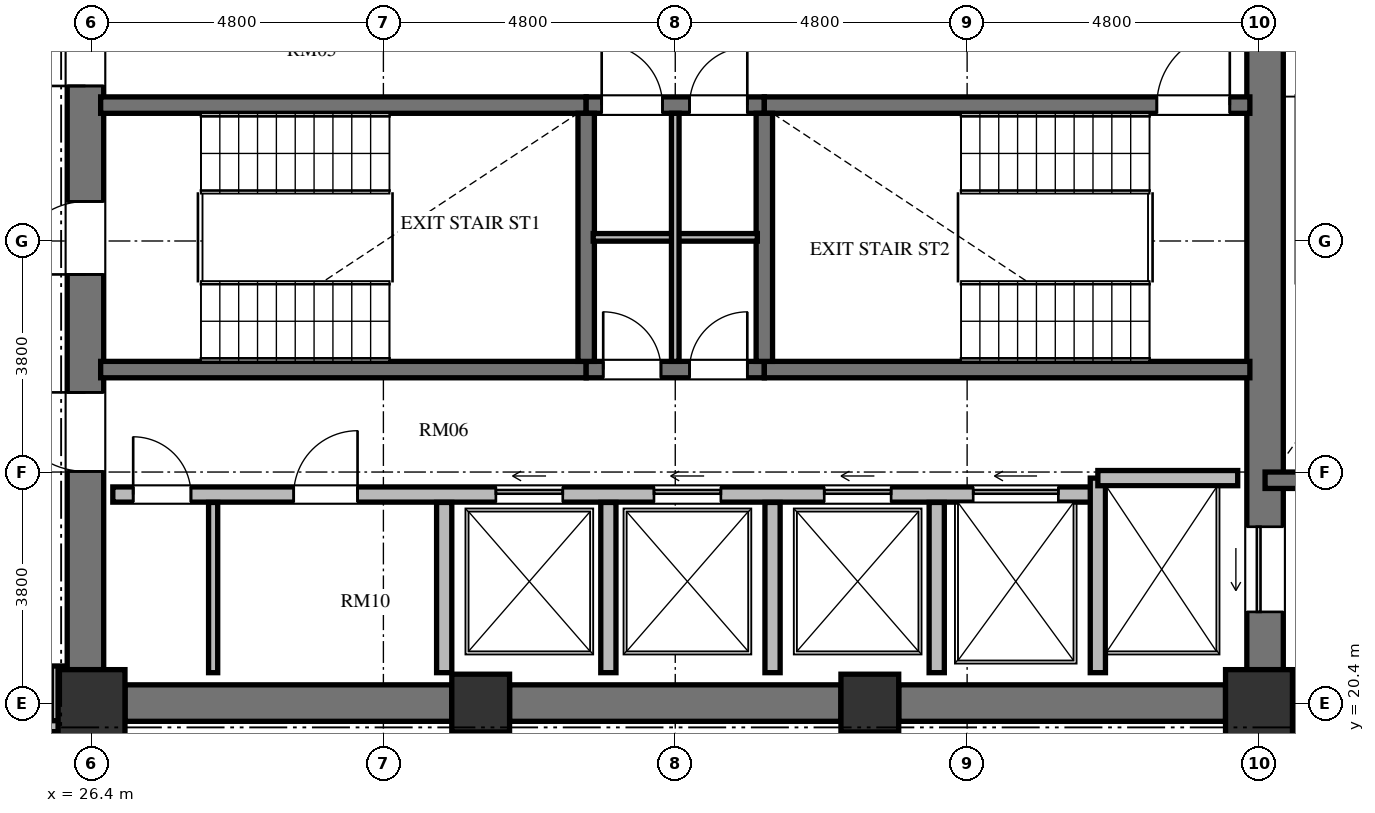
"""IFC4 building model, lengths in metres.
Left out: names, types, materials, properties, quantities, classifications, styles, units other than length and angle.
Written with IfcOpenShell. Run it as: python <this file> out.ifc"""

import sys

from ifc_helpers import new_model, si_unit, direction, frame, frame_2d, origin, origin_2d, place, context, subcontext, project, spatial, rectangle, extrude, element, fill, save


model = new_model("IFC4")
c1 = context("Model", 3, precision=1e-05, world=origin(), true_north=direction((0.0, 1.0)))
c2 = subcontext(c1, "Body", "Model", "MODEL_VIEW")
j1 = project(units=[si_unit("LENGTHUNIT", "METRE"), si_unit("PLANEANGLEUNIT", "RADIAN")], contexts=[c1])
p1 = place(None, origin())
s1 = spatial("IfcSite", under=j1, at=p1, CompositionType="ELEMENT")
p2 = place(p1, origin())
s2 = spatial("IfcBuilding", under=s1, at=p2, CompositionType="ELEMENT")
p3 = place(p2, frame((0.0, 0.0, 182.064)))
s3 = spatial("IfcBuildingStorey", under=s2, at=p3, CompositionType="ELEMENT", Elevation=182.064)
p4 = place(p3, frame((26.4, 20.4, 0.0), z_axis=(0.0, 0.0, 1.0), x_axis=(1.0, 0.0, 0.0)))
e1 = element("IfcColumn", 1, at=p4, inside=s3, PredefinedType="COLUMN", context=c2, shape_type="SweptSolid", body=[
    extrude(rectangle(XDim=1.1, YDim=1.1, at=origin_2d()), origin(), (0.0, 0.0, 1.0), 3.648),
])
for number, where, z_axis, x_axis in (
    (2, (32.8, 20.4, 0.0), (0.0, 0.0, 1.0), (1.0, 0.0, 0.0)),
    (3, (39.2, 20.4, 0.0), (0.0, 0.0, 1.0), (1.0, 0.0, 0.0)),
):
    element("IfcColumn", number, at=place(p3, frame(where, z_axis=z_axis, x_axis=x_axis)), inside=s3, PredefinedType="COLUMN", context=c2, shape_type="SweptSolid", body=[
        extrude(rectangle(XDim=0.95, YDim=0.95, at=origin_2d()), origin(), (0.0, 0.0, 1.0), 3.648),
    ])
p5 = place(p3, frame((45.6, 20.4, 0.0), z_axis=(0.0, 0.0, 1.0), x_axis=(1.0, 0.0, 0.0)))
e4 = element("IfcColumn", 4, at=p5, inside=s3, PredefinedType="COLUMN", context=c2, shape_type="SweptSolid", body=[
    extrude(rectangle(XDim=1.1, YDim=1.1, at=origin_2d()), origin(), (0.0, 0.0, 1.0), 3.648),
])
p6 = place(p3, frame((26.3, 20.95, 0.0), z_axis=(0.0, 0.0, 1.0), x_axis=(0.0, 1.0, 0.0)))
e5 = element("IfcWall", 5, at=p6, inside=s3, PredefinedType="SHEAR", context=c2, shape_type="SweptSolid", body=[
    extrude(rectangle(XDim=14.1, YDim=0.6, at=frame_2d((7.05, 0.0))), origin(), (0.0, 0.0, 1.0), 3.648),
])
p7 = place(p6, frame((6.5, 0.0, 0.0)))
e6 = element("IfcOpeningElement", 6, at=p7, cuts=e5, PredefinedType="OPENING", context=c2, shape_type="SweptSolid", body=[
    extrude(rectangle(XDim=1.2, YDim=2.15, at=frame_2d((0.6, 1.075))), frame((0.0, 0.31, 0.0), z_axis=(0.0, -1.0, 0.0), x_axis=(1.0, 0.0, 0.0)), (0.0, 0.0, 1.0), 0.62),
])
p8 = place(p6, frame((9.6, 0.0, 0.0)))
e7 = element("IfcOpeningElement", 7, at=p8, cuts=e5, PredefinedType="OPENING", context=c2, shape_type="SweptSolid", body=[
    extrude(rectangle(XDim=1.3, YDim=2.2, at=frame_2d((0.65, 1.1))), frame((0.0, 0.31, 0.0), z_axis=(0.0, -1.0, 0.0), x_axis=(1.0, 0.0, 0.0)), (0.0, 0.0, 1.0), 0.62),
])
p9 = place(p6, frame((3.26, 0.0, 0.0)))
e8 = element("IfcOpeningElement", 8, at=p9, cuts=e5, PredefinedType="OPENING", context=c2, shape_type="SweptSolid", body=[
    extrude(rectangle(XDim=1.3, YDim=2.2, at=frame_2d((0.65, 1.1))), frame((0.0, 0.31, 0.0), z_axis=(0.0, -1.0, 0.0), x_axis=(1.0, 0.0, 0.0)), (0.0, 0.0, 1.0), 0.62),
])
p10 = place(p3, frame((45.7, 20.95, 0.0), z_axis=(0.0, 0.0, 1.0), x_axis=(0.0, 1.0, 0.0)))
e9 = element("IfcWall", 9, at=p10, inside=s3, PredefinedType="SHEAR", context=c2, shape_type="SweptSolid", body=[
    extrude(rectangle(XDim=14.1, YDim=0.6, at=frame_2d((7.05, 0.0))), origin(), (0.0, 0.0, 1.0), 3.648),
])
p11 = place(p10, frame((11.75, 0.0, 0.0)))
e10 = element("IfcOpeningElement", 10, at=p11, cuts=e9, PredefinedType="OPENING", context=c2, shape_type="SweptSolid", body=[
    extrude(rectangle(XDim=1.4, YDim=2.3, at=frame_2d((0.7, 1.15))), frame((0.0, 0.31, 0.0), z_axis=(0.0, -1.0, 0.0), x_axis=(1.0, 0.0, 0.0)), (0.0, 0.0, 1.0), 0.62),
])
p12 = place(p10, frame((0.95, 0.0, 0.0)))
e11 = element("IfcOpeningElement", 11, at=p12, cuts=e9, PredefinedType="OPENING", context=c2, shape_type="SweptSolid", body=[
    extrude(rectangle(XDim=1.4, YDim=2.3, at=frame_2d((0.7, 1.15))), frame((0.0, 0.31, 0.0), z_axis=(0.0, -1.0, 0.0), x_axis=(1.0, 0.0, 0.0)), (0.0, 0.0, 1.0), 0.62),
])
p13 = place(p3, frame((26.95, 20.4, 0.0), z_axis=(0.0, 0.0, 1.0), x_axis=(1.0, 0.0, 0.0)))
e12 = element("IfcWall", 12, at=p13, inside=s3, PredefinedType="SHEAR", context=c2, shape_type="SweptSolid", body=[
    extrude(rectangle(XDim=5.375, YDim=0.6, at=frame_2d((2.688, 0.0))), origin(), (0.0, 0.0, 1.0), 3.648),
])
p14 = place(p3, frame((33.275, 20.4, 0.0), z_axis=(0.0, 0.0, 1.0), x_axis=(1.0, 0.0, 0.0)))
e13 = element("IfcWall", 13, at=p14, inside=s3, PredefinedType="SHEAR", context=c2, shape_type="SweptSolid", body=[
    extrude(rectangle(XDim=5.45, YDim=0.6, at=frame_2d((2.725, 0.0))), origin(), (0.0, 0.0, 1.0), 3.648),
])
p15 = place(p3, frame((39.675, 20.4, 0.0), z_axis=(0.0, 0.0, 1.0), x_axis=(1.0, 0.0, 0.0)))
e14 = element("IfcWall", 14, at=p15, inside=s3, PredefinedType="SHEAR", context=c2, shape_type="SweptSolid", body=[
    extrude(rectangle(XDim=5.375, YDim=0.6, at=frame_2d((2.688, 0.0))), origin(), (0.0, 0.0, 1.0), 3.648),
])
p16 = place(p3, frame((26.55, 30.235, 0.0), z_axis=(0.0, 0.0, 1.0), x_axis=(1.0, 0.0, 0.0)))
e15 = element("IfcWall", 15, at=p16, inside=s3, PredefinedType="SHEAR", context=c2, shape_type="SweptSolid", body=[
    extrude(rectangle(XDim=7.985, YDim=0.27, at=frame_2d((3.992, 0.0))), origin(), (0.0, 0.0, 1.0), 3.648),
])
p17 = place(p3, frame((34.535, 30.235, 0.0), z_axis=(0.0, 0.0, 1.0), x_axis=(1.0, 0.0, 0.0)))
e16 = element("IfcWall", 16, at=p17, inside=s3, PredefinedType="SHEAR", context=c2, shape_type="SweptSolid", body=[
    extrude(rectangle(XDim=2.93, YDim=0.27, at=frame_2d((1.465, 0.0))), origin(), (0.0, 0.0, 1.0), 3.648),
])
p18 = place(p17, frame((0.255, 0.0, 0.0)))
e17 = element("IfcOpeningElement", 17, at=p18, cuts=e16, PredefinedType="OPENING", context=c2, shape_type="SweptSolid", body=[
    extrude(rectangle(XDim=1.0, YDim=2.1, at=frame_2d((0.5, 1.05))), frame((0.0, 0.145, 0.0), z_axis=(0.0, -1.0, 0.0), x_axis=(1.0, 0.0, 0.0)), (0.0, 0.0, 1.0), 0.29),
])
p19 = place(p17, frame((1.7, 0.0, 0.0)))
e18 = element("IfcOpeningElement", 18, at=p19, cuts=e16, PredefinedType="OPENING", context=c2, shape_type="SweptSolid", body=[
    extrude(rectangle(XDim=0.95, YDim=2.1, at=frame_2d((0.475, 1.05))), frame((0.0, 0.145, 0.0), z_axis=(0.0, -1.0, 0.0), x_axis=(1.0, 0.0, 0.0)), (0.0, 0.0, 1.0), 0.29),
])
p20 = place(p3, frame((37.465, 30.235, 0.0), z_axis=(0.0, 0.0, 1.0), x_axis=(1.0, 0.0, 0.0)))
e19 = element("IfcWall", 19, at=p20, inside=s3, PredefinedType="SHEAR", context=c2, shape_type="SweptSolid", body=[
    extrude(rectangle(XDim=7.985, YDim=0.27, at=frame_2d((3.992, 0.0))), origin(), (0.0, 0.0, 1.0), 3.648),
])
p21 = place(p20, frame((6.455, 0.0, 0.0)))
e20 = element("IfcOpeningElement", 20, at=p21, cuts=e19, PredefinedType="OPENING", context=c2, shape_type="SweptSolid", body=[
    extrude(rectangle(XDim=1.2, YDim=2.15, at=frame_2d((0.6, 1.075))), frame((0.0, 0.145, 0.0), z_axis=(0.0, -1.0, 0.0), x_axis=(1.0, 0.0, 0.0)), (0.0, 0.0, 1.0), 0.29),
])
p22 = place(p3, frame((26.55, 25.885, 0.0), z_axis=(0.0, 0.0, 1.0), x_axis=(1.0, 0.0, 0.0)))
e21 = element("IfcWall", 21, at=p22, inside=s3, PredefinedType="SHEAR", context=c2, shape_type="SweptSolid", body=[
    extrude(rectangle(XDim=7.985, YDim=0.27, at=frame_2d((3.992, 0.0))), origin(), (0.0, 0.0, 1.0), 3.648),
])
p23 = place(p3, frame((34.535, 25.885, 0.0), z_axis=(0.0, 0.0, 1.0), x_axis=(1.0, 0.0, 0.0)))
e22 = element("IfcWall", 22, at=p23, inside=s3, PredefinedType="SHEAR", context=c2, shape_type="SweptSolid", body=[
    extrude(rectangle(XDim=2.93, YDim=0.27, at=frame_2d((1.465, 0.0))), origin(), (0.0, 0.0, 1.0), 3.648),
])
p24 = place(p23, frame((0.28, 0.0, 0.0)))
e23 = element("IfcOpeningElement", 23, at=p24, cuts=e22, PredefinedType="OPENING", context=c2, shape_type="SweptSolid", body=[
    extrude(rectangle(XDim=0.95, YDim=2.1, at=frame_2d((0.475, 1.05))), frame((0.0, 0.145, 0.0), z_axis=(0.0, -1.0, 0.0), x_axis=(1.0, 0.0, 0.0)), (0.0, 0.0, 1.0), 0.29),
])
p25 = place(p23, frame((1.7, 0.0, 0.0)))
e24 = element("IfcOpeningElement", 24, at=p25, cuts=e22, PredefinedType="OPENING", context=c2, shape_type="SweptSolid", body=[
    extrude(rectangle(XDim=0.95, YDim=2.1, at=frame_2d((0.475, 1.05))), frame((0.0, 0.145, 0.0), z_axis=(0.0, -1.0, 0.0), x_axis=(1.0, 0.0, 0.0)), (0.0, 0.0, 1.0), 0.29),
])
p26 = place(p3, frame((37.465, 25.885, 0.0), z_axis=(0.0, 0.0, 1.0), x_axis=(1.0, 0.0, 0.0)))
e25 = element("IfcWall", 25, at=p26, inside=s3, PredefinedType="SHEAR", context=c2, shape_type="SweptSolid", body=[
    extrude(rectangle(XDim=7.985, YDim=0.27, at=frame_2d((3.992, 0.0))), origin(), (0.0, 0.0, 1.0), 3.648),
])
for number, where, z_axis, x_axis in (
    (26, (34.535, 26.02, 0.0), (0.0, 0.0, 1.0), (0.0, 1.0, 0.0)),
    (27, (37.465, 26.02, 0.0), (0.0, 0.0, 1.0), (0.0, 1.0, 0.0)),
):
    element("IfcWall", number, at=place(p3, frame(where, z_axis=z_axis, x_axis=x_axis)), inside=s3, PredefinedType="SHEAR", context=c2, shape_type="SweptSolid", body=[
        extrude(rectangle(XDim=4.08, YDim=0.27, at=frame_2d((2.04, 0.0))), origin(), (0.0, 0.0, 1.0), 3.648),
    ])
p27 = place(p3, frame((34.65, 28.06, 0.0), z_axis=(0.0, 0.0, 1.0), x_axis=(1.0, 0.0, 0.0)))
e28 = element("IfcWall", 28, at=p27, inside=s3, PredefinedType="PARTITIONING", context=c2, shape_type="SweptSolid", body=[
    extrude(rectangle(XDim=2.7, YDim=0.125, at=frame_2d((1.35, 0.0))), origin(), (0.0, 0.0, 1.0), 3.428),
])
p28 = place(p3, frame((36.0, 26.02, 0.0), z_axis=(0.0, 0.0, 1.0), x_axis=(0.0, 1.0, 0.0)))
e29 = element("IfcWall", 29, at=p28, inside=s3, PredefinedType="PARTITIONING", context=c2, shape_type="SweptSolid", body=[
    extrude(rectangle(XDim=4.08, YDim=0.125, at=frame_2d((2.04, 0.0))), origin(), (0.0, 0.0, 1.0), 3.428),
])
p29 = place(p3, frame((26.75, 23.83, 0.0), z_axis=(0.0, 0.0, 1.0), x_axis=(1.0, 0.0, 0.0)))
e30 = element("IfcWall", 30, at=p29, inside=s3, PredefinedType="SOLIDWALL", context=c2, shape_type="SweptSolid", body=[
    extrude(rectangle(XDim=16.2, YDim=0.25, at=frame_2d((8.1, 0.0))), origin(), (0.0, 0.0, 1.0), 3.428),
])
p30 = place(p29, frame((0.335, 0.0, 0.0)))
e31 = element("IfcOpeningElement", 31, at=p30, cuts=e30, PredefinedType="OPENING", context=c2, shape_type="SweptSolid", body=[
    extrude(rectangle(XDim=0.95, YDim=2.1, at=frame_2d((0.475, 1.05))), frame((0.0, 0.135, 0.0), z_axis=(0.0, -1.0, 0.0), x_axis=(1.0, 0.0, 0.0)), (0.0, 0.0, 1.0), 0.27),
])
p31 = place(p29, frame((2.975, 0.0, 0.0)))
e32 = element("IfcOpeningElement", 32, at=p31, cuts=e30, PredefinedType="OPENING", context=c2, shape_type="SweptSolid", body=[
    extrude(rectangle(XDim=1.05, YDim=2.15, at=frame_2d((0.525, 1.075))), frame((0.0, 0.135, 0.0), z_axis=(0.0, -1.0, 0.0), x_axis=(1.0, 0.0, 0.0)), (0.0, 0.0, 1.0), 0.27),
])
p32 = place(p29, frame((6.3, 0.0, 0.0)))
e33 = element("IfcOpeningElement", 33, at=p32, cuts=e30, PredefinedType="OPENING", context=c2, shape_type="SweptSolid", body=[
    extrude(rectangle(XDim=1.1, YDim=2.2, at=frame_2d((0.55, 1.1))), frame((0.0, 0.135, 0.0), z_axis=(0.0, -1.0, 0.0), x_axis=(1.0, 0.0, 0.0)), (0.0, 0.0, 1.0), 0.27),
])
p33 = place(p29, frame((8.9, 0.0, 0.0)))
e34 = element("IfcOpeningElement", 34, at=p33, cuts=e30, PredefinedType="OPENING", context=c2, shape_type="SweptSolid", body=[
    extrude(rectangle(XDim=1.1, YDim=2.2, at=frame_2d((0.55, 1.1))), frame((0.0, 0.135, 0.0), z_axis=(0.0, -1.0, 0.0), x_axis=(1.0, 0.0, 0.0)), (0.0, 0.0, 1.0), 0.27),
])
p34 = place(p29, frame((11.7, 0.0, 0.0)))
e35 = element("IfcOpeningElement", 35, at=p34, cuts=e30, PredefinedType="OPENING", context=c2, shape_type="SweptSolid", body=[
    extrude(rectangle(XDim=1.1, YDim=2.2, at=frame_2d((0.55, 1.1))), frame((0.0, 0.135, 0.0), z_axis=(0.0, -1.0, 0.0), x_axis=(1.0, 0.0, 0.0)), (0.0, 0.0, 1.0), 0.27),
])
p35 = place(p29, frame((14.15, 0.0, 0.0)))
e36 = element("IfcOpeningElement", 36, at=p35, cuts=e30, PredefinedType="OPENING", context=c2, shape_type="SweptSolid", body=[
    extrude(rectangle(XDim=1.4, YDim=2.3, at=frame_2d((0.7, 1.15))), frame((0.0, 0.135, 0.0), z_axis=(0.0, -1.0, 0.0), x_axis=(1.0, 0.0, 0.0)), (0.0, 0.0, 1.0), 0.27),
])
p36 = place(p3, frame((42.95, 20.9, 0.0), z_axis=(0.0, 0.0, 1.0), x_axis=(0.0, 1.0, 0.0)))
e37 = element("IfcWall", 37, at=p36, inside=s3, PredefinedType="SOLIDWALL", context=c2, shape_type="SweptSolid", body=[
    extrude(rectangle(XDim=3.2, YDim=0.25, at=frame_2d((1.6, 0.0))), origin(), (0.0, 0.0, 1.0), 3.428),
])
p37 = place(p3, frame((42.95, 24.1, 0.0), z_axis=(0.0, 0.0, 1.0), x_axis=(1.0, 0.0, 0.0)))
e38 = element("IfcWall", 38, at=p37, inside=s3, PredefinedType="SOLIDWALL", context=c2, shape_type="SweptSolid", body=[
    extrude(rectangle(XDim=2.3, YDim=0.25, at=frame_2d((1.15, 0.0))), origin(), (0.0, 0.0, 1.0), 3.428),
])
for number, where, z_axis, x_axis in (
    (39, (32.2, 20.9, 0.0), (0.0, 0.0, 1.0), (0.0, 1.0, 0.0)),
    (40, (34.9, 20.9, 0.0), (0.0, 0.0, 1.0), (0.0, 1.0, 0.0)),
    (41, (37.6, 20.9, 0.0), (0.0, 0.0, 1.0), (0.0, 1.0, 0.0)),
    (42, (40.3, 20.9, 0.0), (0.0, 0.0, 1.0), (0.0, 1.0, 0.0)),
):
    element("IfcWall", number, at=place(p3, frame(where, z_axis=z_axis, x_axis=x_axis)), inside=s3, PredefinedType="SOLIDWALL", context=c2, shape_type="SweptSolid", body=[
        extrude(rectangle(XDim=2.8, YDim=0.25, at=frame_2d((1.4, 0.0))), origin(), (0.0, 0.0, 1.0), 3.428),
    ])
p38 = place(p3, frame((28.4, 20.9, 0.0), z_axis=(0.0, 0.0, 1.0), x_axis=(0.0, 1.0, 0.0)))
e43 = element("IfcWall", 43, at=p38, inside=s3, PredefinedType="PARTITIONING", context=c2, shape_type="SweptSolid", body=[
    extrude(rectangle(XDim=2.8, YDim=0.15, at=frame_2d((1.4, 0.0))), origin(), (0.0, 0.0, 1.0), 3.428),
])
p39 = place(p3, frame((45.7, 24.065, 0.0), z_axis=(0.0, 0.0, 1.0), x_axis=(1.0, 0.0, 0.0)))
e44 = element("IfcWall", 44, at=p39, inside=s3, PredefinedType="SHEAR", context=c2, shape_type="SweptSolid", body=[
    extrude(rectangle(XDim=4.715, YDim=0.27, at=frame_2d((2.357, 0.0))), origin(), (0.0, 0.0, 1.0), 3.648),
])
p40 = place(p3, frame((45.7, 20.02, 0.0), z_axis=(0.0, 0.0, 1.0), x_axis=(1.0, 0.0, 0.0)))
e45 = element("IfcWall", 45, at=p40, inside=s3, PredefinedType="SOLIDWALL", context=c2, shape_type="SweptSolid", body=[
    extrude(rectangle(XDim=4.715, YDim=0.25, at=frame_2d((2.357, 0.0))), origin(), (0.0, 0.0, 1.0), 3.428),
])
p41 = place(p3, frame((25.83, 21.01, 0.0), z_axis=(0.0, 0.0, 1.0), x_axis=(0.0, -1.0, 0.0)))
e46 = element("IfcWall", 46, at=p41, inside=s3, PredefinedType="PARTITIONING", context=c2, shape_type="SweptSolid", body=[
    extrude(rectangle(XDim=1.03, YDim=0.18, at=frame_2d((0.515, 0.0))), origin(), (0.0, 0.0, 1.0), 3.428),
])
p42 = place(p3, frame((25.87, 20.02, 0.0), z_axis=(0.0, 0.0, 1.0), x_axis=(-1.0, 0.0, 0.0)))
e47 = element("IfcWall", 47, at=p42, inside=s3, PredefinedType="PARTITIONING", context=c2, shape_type="SweptSolid", body=[
    extrude(rectangle(XDim=2.56, YDim=0.18, at=frame_2d((1.28, 0.0))), origin(), (0.0, 0.0, 1.0), 3.428),
])
p43 = place(p42, frame((0.58, 0.0, 0.0)))
e48 = element("IfcOpeningElement", 48, at=p43, cuts=e47, PredefinedType="OPENING", context=c2, shape_type="SweptSolid", body=[
    extrude(rectangle(XDim=1.4, YDim=2.2, at=frame_2d((0.7, 1.1))), frame((0.0, 0.1, 0.0), z_axis=(0.0, -1.0, 0.0), x_axis=(1.0, 0.0, 0.0)), (0.0, 0.0, 1.0), 0.2),
])
p44 = place(p7, origin())
e49 = element("IfcDoor", 49, at=p44, inside=s3, OperationType="SINGLE_SWING_LEFT", PredefinedType="DOOR", context=c2, shape_type="SweptSolid", body=[
    extrude(rectangle(XDim=1.2, YDim=2.15, at=frame_2d((0.6, 1.075))), frame((0.0, 0.025, 0.0), z_axis=(0.0, -1.0, 0.0), x_axis=(1.0, 0.0, 0.0)), (0.0, 0.0, 1.0), 0.05),
])
fill(e6, e49)
p45 = place(p21, origin())
e50 = element("IfcDoor", 50, at=p45, inside=s3, OperationType="SINGLE_SWING_RIGHT", PredefinedType="DOOR", context=c2, shape_type="SweptSolid", body=[
    extrude(rectangle(XDim=1.2, YDim=2.15, at=frame_2d((0.6, 1.075))), frame((0.0, 0.025, 0.0), z_axis=(0.0, -1.0, 0.0), x_axis=(1.0, 0.0, 0.0)), (0.0, 0.0, 1.0), 0.05),
])
fill(e20, e50)
p46 = place(p24, origin())
e51 = element("IfcDoor", 51, at=p46, inside=s3, OperationType="SINGLE_SWING_LEFT", PredefinedType="DOOR", context=c2, shape_type="SweptSolid", body=[
    extrude(rectangle(XDim=0.95, YDim=2.1, at=frame_2d((0.475, 1.05))), frame((0.0, 0.025, 0.0), z_axis=(0.0, -1.0, 0.0), x_axis=(1.0, 0.0, 0.0)), (0.0, 0.0, 1.0), 0.05),
])
fill(e23, e51)
p47 = place(p25, origin())
e52 = element("IfcDoor", 52, at=p47, inside=s3, OperationType="SINGLE_SWING_RIGHT", PredefinedType="DOOR", context=c2, shape_type="SweptSolid", body=[
    extrude(rectangle(XDim=0.95, YDim=2.1, at=frame_2d((0.475, 1.05))), frame((0.0, 0.025, 0.0), z_axis=(0.0, -1.0, 0.0), x_axis=(1.0, 0.0, 0.0)), (0.0, 0.0, 1.0), 0.05),
])
fill(e24, e52)
p48 = place(p18, origin())
e53 = element("IfcDoor", 53, at=p48, inside=s3, OperationType="SINGLE_SWING_LEFT", PredefinedType="DOOR", context=c2, shape_type="SweptSolid", body=[
    extrude(rectangle(XDim=1.0, YDim=2.1, at=frame_2d((0.5, 1.05))), frame((0.0, 0.025, 0.0), z_axis=(0.0, -1.0, 0.0), x_axis=(1.0, 0.0, 0.0)), (0.0, 0.0, 1.0), 0.05),
])
fill(e17, e53)
p49 = place(p19, origin())
e54 = element("IfcDoor", 54, at=p49, inside=s3, OperationType="SINGLE_SWING_RIGHT", PredefinedType="DOOR", context=c2, shape_type="SweptSolid", body=[
    extrude(rectangle(XDim=0.95, YDim=2.1, at=frame_2d((0.475, 1.05))), frame((0.0, 0.025, 0.0), z_axis=(0.0, -1.0, 0.0), x_axis=(1.0, 0.0, 0.0)), (0.0, 0.0, 1.0), 0.05),
])
fill(e18, e54)
p50 = place(p8, origin())
e55 = element("IfcDoor", 55, at=p50, inside=s3, OperationType="SINGLE_SWING_LEFT", PredefinedType="DOOR", context=c2, shape_type="SweptSolid", body=[
    extrude(rectangle(XDim=1.3, YDim=2.2, at=frame_2d((0.65, 1.1))), frame((0.0, 0.025, 0.0), z_axis=(0.0, -1.0, 0.0), x_axis=(1.0, 0.0, 0.0)), (0.0, 0.0, 1.0), 0.05),
])
fill(e7, e55)
p51 = place(p9, origin())
e56 = element("IfcDoor", 56, at=p51, inside=s3, OperationType="SINGLE_SWING_RIGHT", PredefinedType="DOOR", context=c2, shape_type="SweptSolid", body=[
    extrude(rectangle(XDim=1.3, YDim=2.2, at=frame_2d((0.65, 1.1))), frame((0.0, 0.025, 0.0), z_axis=(0.0, -1.0, 0.0), x_axis=(1.0, 0.0, 0.0)), (0.0, 0.0, 1.0), 0.05),
])
fill(e8, e56)
p52 = place(p30, origin())
e57 = element("IfcDoor", 57, at=p52, inside=s3, OperationType="SINGLE_SWING_LEFT", PredefinedType="DOOR", context=c2, shape_type="SweptSolid", body=[
    extrude(rectangle(XDim=0.95, YDim=2.1, at=frame_2d((0.475, 1.05))), frame((0.0, 0.025, 0.0), z_axis=(0.0, -1.0, 0.0), x_axis=(1.0, 0.0, 0.0)), (0.0, 0.0, 1.0), 0.05),
])
fill(e31, e57)
p53 = place(p31, origin())
e58 = element("IfcDoor", 58, at=p53, inside=s3, OperationType="SINGLE_SWING_RIGHT", PredefinedType="DOOR", context=c2, shape_type="SweptSolid", body=[
    extrude(rectangle(XDim=1.05, YDim=2.15, at=frame_2d((0.525, 1.075))), frame((0.0, 0.025, 0.0), z_axis=(0.0, -1.0, 0.0), x_axis=(1.0, 0.0, 0.0)), (0.0, 0.0, 1.0), 0.05),
])
fill(e32, e58)
p54 = place(p32, origin())
e59 = element("IfcDoor", 59, at=p54, inside=s3, OperationType="SLIDING_TO_LEFT", PredefinedType="DOOR", context=c2, shape_type="SweptSolid", body=[
    extrude(rectangle(XDim=1.1, YDim=2.2, at=frame_2d((0.55, 1.1))), frame((0.0, 0.025, 0.0), z_axis=(0.0, -1.0, 0.0), x_axis=(1.0, 0.0, 0.0)), (0.0, 0.0, 1.0), 0.05),
])
fill(e33, e59)
p55 = place(p33, origin())
e60 = element("IfcDoor", 60, at=p55, inside=s3, OperationType="SLIDING_TO_LEFT", PredefinedType="DOOR", context=c2, shape_type="SweptSolid", body=[
    extrude(rectangle(XDim=1.1, YDim=2.2, at=frame_2d((0.55, 1.1))), frame((0.0, 0.025, 0.0), z_axis=(0.0, -1.0, 0.0), x_axis=(1.0, 0.0, 0.0)), (0.0, 0.0, 1.0), 0.05),
])
fill(e34, e60)
p56 = place(p34, origin())
e61 = element("IfcDoor", 61, at=p56, inside=s3, OperationType="SLIDING_TO_LEFT", PredefinedType="DOOR", context=c2, shape_type="SweptSolid", body=[
    extrude(rectangle(XDim=1.1, YDim=2.2, at=frame_2d((0.55, 1.1))), frame((0.0, 0.025, 0.0), z_axis=(0.0, -1.0, 0.0), x_axis=(1.0, 0.0, 0.0)), (0.0, 0.0, 1.0), 0.05),
])
fill(e35, e61)
p57 = place(p12, origin())
e62 = element("IfcDoor", 62, at=p57, inside=s3, OperationType="SLIDING_TO_LEFT", PredefinedType="DOOR", context=c2, shape_type="SweptSolid", body=[
    extrude(rectangle(XDim=1.4, YDim=2.3, at=frame_2d((0.7, 1.15))), frame((0.0, 0.025, 0.0), z_axis=(0.0, -1.0, 0.0), x_axis=(1.0, 0.0, 0.0)), (0.0, 0.0, 1.0), 0.05),
])
fill(e11, e62)
p58 = place(p35, origin())
e63 = element("IfcDoor", 63, at=p58, inside=s3, OperationType="SLIDING_TO_LEFT", PredefinedType="DOOR", context=c2, shape_type="SweptSolid", body=[
    extrude(rectangle(XDim=1.4, YDim=2.3, at=frame_2d((0.7, 1.15))), frame((0.0, 0.025, 0.0), z_axis=(0.0, -1.0, 0.0), x_axis=(1.0, 0.0, 0.0)), (0.0, 0.0, 1.0), 0.05),
])
fill(e36, e63)
save(model, sys.argv[1])
